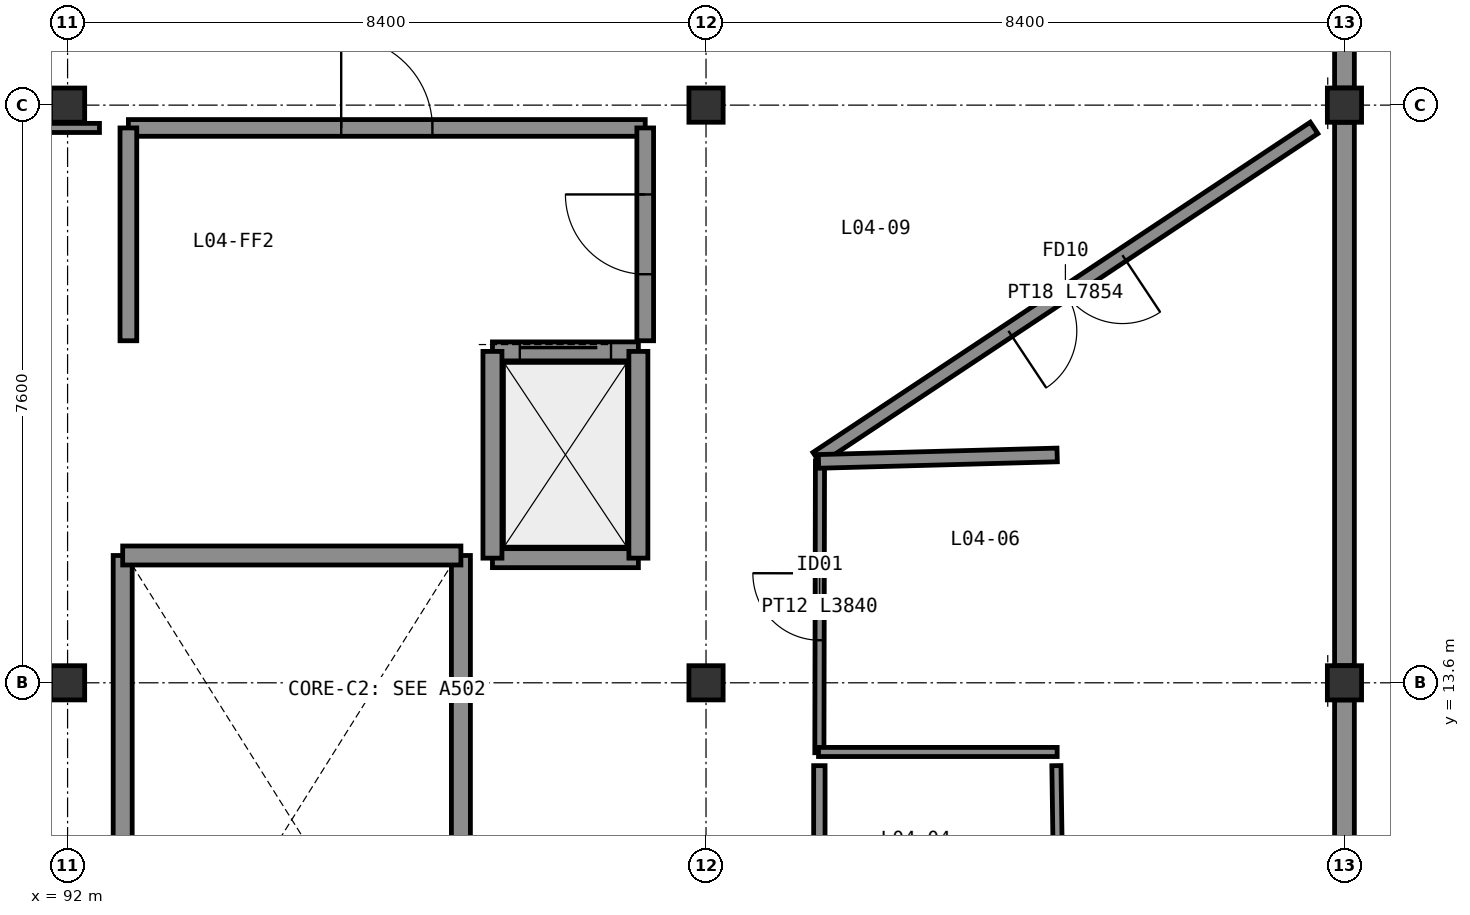
"""IFC4 building model, lengths in metres.
Left out: names, types, materials, properties, quantities, classifications, styles, units other than length and angle.
Written with IfcOpenShell. Run it as: python <this file> out.ifc"""

import sys

from ifc_helpers import new_model, si_unit, direction, frame, frame_2d, origin, origin_2d, place, context, subcontext, project, spatial, rectangle, extrude, element, fill, save


model = new_model("IFC4")
c1 = context("Model", 3, precision=1e-05, world=origin(), true_north=direction((0.0, 1.0)))
c2 = subcontext(c1, "Body", "Model", "MODEL_VIEW")
j1 = project(units=[si_unit("LENGTHUNIT", "METRE"), si_unit("PLANEANGLEUNIT", "RADIAN")], contexts=[c1])
p1 = place(None, origin())
s1 = spatial("IfcSite", under=j1, at=p1, CompositionType="ELEMENT")
p2 = place(p1, origin())
s2 = spatial("IfcBuilding", under=s1, at=p2, CompositionType="ELEMENT")
p3 = place(p2, frame((0.0, 0.0, 18.0)))
s3 = spatial("IfcBuildingStorey", under=s2, at=p3, CompositionType="ELEMENT", Elevation=18.0)
for number, where, z_axis, x_axis in (
    (1, (92.0, 13.6, 0.0), (0.0, 0.0, 1.0), (1.0, 0.0, 0.0)),
    (2, (100.4, 13.6, 0.0), (0.0, 0.0, 1.0), (1.0, 0.0, 0.0)),
    (3, (108.8, 13.6, 0.0), (0.0, 0.0, 1.0), (1.0, 0.0, 0.0)),
    (4, (92.0, 21.2, 0.0), (0.0, 0.0, 1.0), (1.0, 0.0, 0.0)),
    (5, (100.4, 21.2, 0.0), (0.0, 0.0, 1.0), (1.0, 0.0, 0.0)),
    (6, (108.8, 21.2, 0.0), (0.0, 0.0, 1.0), (1.0, 0.0, 0.0)),
):
    element("IfcColumn", number, at=place(p3, frame(where, z_axis=z_axis, x_axis=x_axis)), inside=s3, PredefinedType="COLUMN", context=c2, shape_type="SweptSolid", body=[
        extrude(rectangle(XDim=0.45, YDim=0.45, at=origin_2d()), origin(), (0.0, 0.0, 1.0), 4.2),
    ])
p4 = place(p3, frame((108.8, 6.225, 0.0), z_axis=(0.0, 0.0, 1.0), x_axis=(0.0, 1.0, 0.0)))
e7 = element("IfcWall", 7, at=p4, inside=s3, PredefinedType="SOLIDWALL", context=c2, shape_type="SweptSolid", body=[
    extrude(rectangle(XDim=7.15, YDim=0.26, at=frame_2d((3.575, 0.0))), origin(), (0.0, 0.0, 1.0), 3.135),
])
p5 = place(p3, frame((108.8, 13.825, 0.0), z_axis=(0.0, 0.0, 1.0), x_axis=(0.0, 1.0, 0.0)))
e8 = element("IfcWall", 8, at=p5, inside=s3, PredefinedType="SOLIDWALL", context=c2, shape_type="SweptSolid", body=[
    extrude(rectangle(XDim=7.15, YDim=0.26, at=frame_2d((3.575, 0.0))), origin(), (0.0, 0.0, 1.0), 3.135),
])
p6 = place(p3, frame((108.8, 21.425, 0.0), z_axis=(0.0, 0.0, 1.0), x_axis=(0.0, 1.0, 0.0)))
e9 = element("IfcWall", 9, at=p6, inside=s3, PredefinedType="SOLIDWALL", context=c2, shape_type="SweptSolid", body=[
    extrude(rectangle(XDim=7.15, YDim=0.26, at=frame_2d((3.575, 0.0))), origin(), (0.0, 0.0, 1.0), 3.135),
])
p7 = place(p3, frame((92.725, 6.225, 0.0), z_axis=(0.0, 0.0, 1.0), x_axis=(0.0, 1.0, 0.0)))
e10 = element("IfcWall", 10, at=p7, inside=s3, PredefinedType="SHEAR", context=c2, shape_type="SweptSolid", body=[
    extrude(rectangle(XDim=9.05, YDim=0.25, at=frame_2d((4.525, 0.0))), origin(), (0.0, 0.0, 1.0), 3.96),
])
p8 = place(p3, frame((97.175, 6.225, 0.0), z_axis=(0.0, 0.0, 1.0), x_axis=(0.0, 1.0, 0.0)))
e11 = element("IfcWall", 11, at=p8, inside=s3, PredefinedType="SHEAR", context=c2, shape_type="SweptSolid", body=[
    extrude(rectangle(XDim=9.05, YDim=0.25, at=frame_2d((4.525, 0.0))), origin(), (0.0, 0.0, 1.0), 3.96),
])
p9 = place(p8, frame((0.55, 0.0, 0.0)))
e12 = element("IfcOpeningElement", 12, at=p9, cuts=e11, PredefinedType="OPENING", context=c2, shape_type="SweptSolid", body=[
    extrude(rectangle(XDim=1.05, YDim=2.1, at=frame_2d((0.525, 1.05))), frame((0.0, 0.135, 0.0), z_axis=(0.0, -1.0, 0.0), x_axis=(1.0, 0.0, 0.0)), (0.0, 0.0, 1.0), 0.27),
])
p10 = place(p3, frame((92.725, 15.275, 0.0), z_axis=(0.0, 0.0, 1.0), x_axis=(1.0, 0.0, 0.0)))
e13 = element("IfcWall", 13, at=p10, inside=s3, PredefinedType="SHEAR", context=c2, shape_type="SweptSolid", body=[
    extrude(rectangle(XDim=4.45, YDim=0.25, at=frame_2d((2.225, 0.0))), origin(), (0.0, 0.0, 1.0), 3.96),
])
p11 = place(p3, frame((92.8, 20.9, 0.0), z_axis=(0.0, 0.0, 1.0), x_axis=(1.0, 0.0, 0.0)))
e14 = element("IfcWall", 14, at=p11, inside=s3, PredefinedType="SOLIDWALL", context=c2, shape_type="SweptSolid", body=[
    extrude(rectangle(XDim=6.8, YDim=0.22, at=frame_2d((3.4, 0.0))), origin(), (0.0, 0.0, 1.0), 3.95),
])
p12 = place(p11, frame((2.8, 0.0, 0.0)))
e15 = element("IfcOpeningElement", 15, at=p12, cuts=e14, PredefinedType="OPENING", context=c2, shape_type="SweptSolid", body=[
    extrude(rectangle(XDim=1.2, YDim=2.1, at=frame_2d((0.6, 1.05))), frame((0.0, 0.12, 0.0), z_axis=(0.0, -1.0, 0.0), x_axis=(1.0, 0.0, 0.0)), (0.0, 0.0, 1.0), 0.24),
])
p13 = place(p3, frame((92.8, 18.1, 0.0), z_axis=(0.0, 0.0, 1.0), x_axis=(0.0, 1.0, 0.0)))
e16 = element("IfcWall", 16, at=p13, inside=s3, PredefinedType="SOLIDWALL", context=c2, shape_type="SweptSolid", body=[
    extrude(rectangle(XDim=2.8, YDim=0.22, at=frame_2d((1.4, 0.0))), origin(), (0.0, 0.0, 1.0), 3.95),
])
p14 = place(p3, frame((99.6, 18.1, 0.0), z_axis=(0.0, 0.0, 1.0), x_axis=(0.0, 1.0, 0.0)))
e17 = element("IfcWall", 17, at=p14, inside=s3, PredefinedType="SOLIDWALL", context=c2, shape_type="SweptSolid", body=[
    extrude(rectangle(XDim=2.8, YDim=0.22, at=frame_2d((1.4, 0.0))), origin(), (0.0, 0.0, 1.0), 3.95),
])
p15 = place(p14, frame((0.875, 0.0, 0.0)))
e18 = element("IfcOpeningElement", 18, at=p15, cuts=e17, PredefinedType="OPENING", context=c2, shape_type="SweptSolid", body=[
    extrude(rectangle(XDim=1.05, YDim=2.1, at=frame_2d((0.525, 1.05))), frame((0.0, 0.12, 0.0), z_axis=(0.0, -1.0, 0.0), x_axis=(1.0, 0.0, 0.0)), (0.0, 0.0, 1.0), 0.24),
])
p16 = place(p3, frame((97.59, 15.24, 0.0), z_axis=(0.0, 0.0, 1.0), x_axis=(1.0, 0.0, 0.0)))
e19 = element("IfcWall", 19, at=p16, inside=s3, PredefinedType="SHEAR", context=c2, shape_type="SweptSolid", body=[
    extrude(rectangle(XDim=1.92, YDim=0.25, at=frame_2d((0.96, 0.0))), origin(), (0.0, 0.0, 1.0), 3.96),
])
p17 = place(p3, frame((97.59, 17.96, 0.0), z_axis=(0.0, 0.0, 1.0), x_axis=(1.0, 0.0, 0.0)))
e20 = element("IfcWall", 20, at=p17, inside=s3, PredefinedType="SHEAR", context=c2, shape_type="SweptSolid", body=[
    extrude(rectangle(XDim=1.92, YDim=0.25, at=frame_2d((0.96, 0.0))), origin(), (0.0, 0.0, 1.0), 3.96),
])
p18 = place(p17, frame((0.36, 0.0, 0.0)))
e21 = element("IfcOpeningElement", 21, at=p18, cuts=e20, PredefinedType="OPENING", context=c2, shape_type="SweptSolid", body=[
    extrude(rectangle(XDim=1.2, YDim=2.2, at=frame_2d((0.6, 1.1))), frame((0.0, 0.135, 0.0), z_axis=(0.0, -1.0, 0.0), x_axis=(1.0, 0.0, 0.0)), (0.0, 0.0, 1.0), 0.27),
])
for number, where, z_axis, x_axis in (
    (22, (97.59, 15.24, 0.0), (0.0, 0.0, 1.0), (0.0, 1.0, 0.0)),
    (23, (99.51, 15.24, 0.0), (0.0, 0.0, 1.0), (0.0, 1.0, 0.0)),
):
    element("IfcWall", number, at=place(p3, frame(where, z_axis=z_axis, x_axis=x_axis)), inside=s3, PredefinedType="SHEAR", context=c2, shape_type="SweptSolid", body=[
        extrude(rectangle(XDim=2.72, YDim=0.25, at=frame_2d((1.36, 0.0))), origin(), (0.0, 0.0, 1.0), 3.96),
    ])
p19 = place(p3, frame((101.891, 12.68, 0.0), z_axis=(0.0, 0.0, 1.0), x_axis=(0.002098030858, 0.999997799131, 0.0)))
e24 = element("IfcWall", 24, at=p19, inside=s3, PredefinedType="PARTITIONING", context=c2, shape_type="SweptSolid", body=[
    extrude(rectangle(XDim=3.84, YDim=0.12, at=frame_2d((1.92, 0.0))), origin(), (0.0, 0.0, 1.0), 3.95),
])
p20 = place(p19, frame((1.48, 0.0, 0.0)))
e25 = element("IfcOpeningElement", 25, at=p20, cuts=e24, PredefinedType="OPENING", context=c2, shape_type="SweptSolid", body=[
    extrude(rectangle(XDim=0.88, YDim=2.08, at=frame_2d((0.44, 1.04))), frame((0.0, 0.07, 0.0), z_axis=(0.0, -1.0, 0.0), x_axis=(1.0, 0.0, 0.0)), (0.0, 0.0, 1.0), 0.14),
])
p21 = place(p3, frame((101.89, 6.4, 0.0), z_axis=(0.0, 0.0, 1.0), x_axis=(0.000239741073, 0.999999971262, 0.0)))
e26 = element("IfcWall", 26, at=p21, inside=s3, PredefinedType="PARTITIONING", context=c2, shape_type="SweptSolid", body=[
    extrude(rectangle(XDim=6.11, YDim=0.15, at=frame_2d((3.055, 0.0))), origin(), (0.0, 0.0, 1.0), 3.95),
])
p22 = place(p21, frame((2.38, 0.0, 0.0)))
e27 = element("IfcOpeningElement", 27, at=p22, cuts=e26, PredefinedType="OPENING", context=c2, shape_type="SweptSolid", body=[
    extrude(rectangle(XDim=1.35, YDim=2.18, at=frame_2d((0.675, 1.09))), frame((0.0, 0.085, 0.0), z_axis=(0.0, -1.0, 0.0), x_axis=(1.0, 0.0, 0.0)), (0.0, 0.0, 1.0), 0.17),
])
p23 = place(p3, frame((108.4, 20.9, 0.0), z_axis=(0.0, 0.0, 1.0), x_axis=(-0.833143866765, -0.553056323779, 0.0)))
e28 = element("IfcWall", 28, at=p23, inside=s3, PredefinedType="PARTITIONING", context=c2, shape_type="SweptSolid", body=[
    extrude(rectangle(XDim=7.854, YDim=0.18, at=frame_2d((3.927, 0.0))), origin(), (0.0, 0.0, 1.0), 3.95),
])
p24 = place(p23, frame((3.027, 0.0, 0.0)))
e29 = element("IfcOpeningElement", 29, at=p24, cuts=e28, PredefinedType="OPENING", context=c2, shape_type="SweptSolid", body=[
    extrude(rectangle(XDim=1.8, YDim=2.2, at=frame_2d((0.9, 1.1))), frame((0.0, 0.1, 0.0), z_axis=(0.0, -1.0, 0.0), x_axis=(1.0, 0.0, 0.0)), (0.0, 0.0, 1.0), 0.2),
])
p25 = place(p3, frame((92.419, 20.9, 0.0), z_axis=(0.0, 0.0, 1.0), x_axis=(-1.0, 0.0, 0.0)))
e30 = element("IfcWall", 30, at=p25, inside=s3, PredefinedType="PARTITIONING", context=c2, shape_type="SweptSolid", body=[
    extrude(rectangle(XDim=16.239, YDim=0.12, at=frame_2d((8.12, 0.0))), origin(), (0.0, 0.0, 1.0), 3.95),
])
p26 = place(p25, frame((6.594, 0.0, 0.0)))
e31 = element("IfcOpeningElement", 31, at=p26, cuts=e30, PredefinedType="OPENING", context=c2, shape_type="SweptSolid", body=[
    extrude(rectangle(XDim=1.45, YDim=2.18, at=frame_2d((0.725, 1.09))), frame((0.0, 0.07, 0.0), z_axis=(0.0, -1.0, 0.0), x_axis=(1.0, 0.0, 0.0)), (0.0, 0.0, 1.0), 0.14),
])
p27 = place(p3, frame((105.02, 12.69, 0.0), z_axis=(0.0, 0.0, 1.0), x_axis=(-1.0, 0.0, 0.0)))
e32 = element("IfcWall", 32, at=p27, inside=s3, PredefinedType="PARTITIONING", context=c2, shape_type="SweptSolid", body=[
    extrude(rectangle(XDim=3.14, YDim=0.12, at=frame_2d((1.57, 0.0))), origin(), (0.0, 0.0, 1.0), 3.95),
])
p28 = place(p3, frame((101.88, 16.513, 0.0), z_axis=(0.0, 0.0, 1.0), x_axis=(0.999632070922, 0.02712421029, 0.0)))
e33 = element("IfcWall", 33, at=p28, inside=s3, PredefinedType="PARTITIONING", context=c2, shape_type="SweptSolid", body=[
    extrude(rectangle(XDim=3.141, YDim=0.18, at=frame_2d((1.571, 0.0))), origin(), (0.0, 0.0, 1.0), 3.95),
])
p29 = place(p3, frame((105.01, 12.51, 0.0), z_axis=(0.0, 0.0, 1.0), x_axis=(0.014742474068, -0.999891323824, 0.0)))
e34 = element("IfcWall", 34, at=p29, inside=s3, PredefinedType="PARTITIONING", context=c2, shape_type="SweptSolid", body=[
    extrude(rectangle(XDim=6.111, YDim=0.12, at=frame_2d((3.055, 0.0))), origin(), (0.0, 0.0, 1.0), 3.95),
])
p30 = place(p29, frame((2.18, 0.0, 0.0)))
e35 = element("IfcOpeningElement", 35, at=p30, cuts=e34, PredefinedType="OPENING", context=c2, shape_type="SweptSolid", body=[
    extrude(rectangle(XDim=1.75, YDim=2.22, at=frame_2d((0.875, 1.11))), frame((0.0, 0.07, 0.0), z_axis=(0.0, -1.0, 0.0), x_axis=(1.0, 0.0, 0.0)), (0.0, 0.0, 1.0), 0.14),
])
p31 = place(p12, origin())
e36 = element("IfcDoor", 36, at=p31, inside=s3, OperationType="SINGLE_SWING_LEFT", PredefinedType="DOOR", context=c2, shape_type="SweptSolid", body=[
    extrude(rectangle(XDim=1.2, YDim=2.1, at=frame_2d((0.6, 1.05))), frame((0.0, 0.025, 0.0), z_axis=(0.0, -1.0, 0.0), x_axis=(1.0, 0.0, 0.0)), (0.0, 0.0, 1.0), 0.05),
])
fill(e15, e36)
p32 = place(p15, origin())
e37 = element("IfcDoor", 37, at=p32, inside=s3, OperationType="SINGLE_SWING_RIGHT", PredefinedType="DOOR", context=c2, shape_type="SweptSolid", body=[
    extrude(rectangle(XDim=1.05, YDim=2.1, at=frame_2d((0.525, 1.05))), frame((0.0, 0.025, 0.0), z_axis=(0.0, -1.0, 0.0), x_axis=(1.0, 0.0, 0.0)), (0.0, 0.0, 1.0), 0.05),
])
fill(e18, e37)
p33 = place(p18, origin())
e38 = element("IfcDoor", 38, at=p33, inside=s3, OperationType="SLIDING_TO_LEFT", PredefinedType="DOOR", context=c2, shape_type="SweptSolid", body=[
    extrude(rectangle(XDim=1.2, YDim=2.2, at=frame_2d((0.6, 1.1))), frame((0.0, 0.025, 0.0), z_axis=(0.0, -1.0, 0.0), x_axis=(1.0, 0.0, 0.0)), (0.0, 0.0, 1.0), 0.05),
])
fill(e21, e38)
p34 = place(p20, origin())
e39 = element("IfcDoor", 39, at=p34, inside=s3, OperationType="SINGLE_SWING_RIGHT", PredefinedType="DOOR", context=c2, shape_type="SweptSolid", body=[
    extrude(rectangle(XDim=0.88, YDim=2.08, at=frame_2d((0.44, 1.04))), frame((0.0, 0.025, 0.0), z_axis=(0.0, -1.0, 0.0), x_axis=(1.0, 0.0, 0.0)), (0.0, 0.0, 1.0), 0.05),
])
fill(e25, e39)
p35 = place(p24, origin())
e40 = element("IfcDoor", 40, at=p35, inside=s3, OperationType="DOUBLE_DOOR_SINGLE_SWING", PredefinedType="DOOR", context=c2, shape_type="SweptSolid", body=[
    extrude(rectangle(XDim=1.8, YDim=2.2, at=frame_2d((0.9, 1.1))), frame((0.0, 0.025, 0.0), z_axis=(0.0, -1.0, 0.0), x_axis=(1.0, 0.0, 0.0)), (0.0, 0.0, 1.0), 0.05),
])
fill(e29, e40)
save(model, sys.argv[1])
